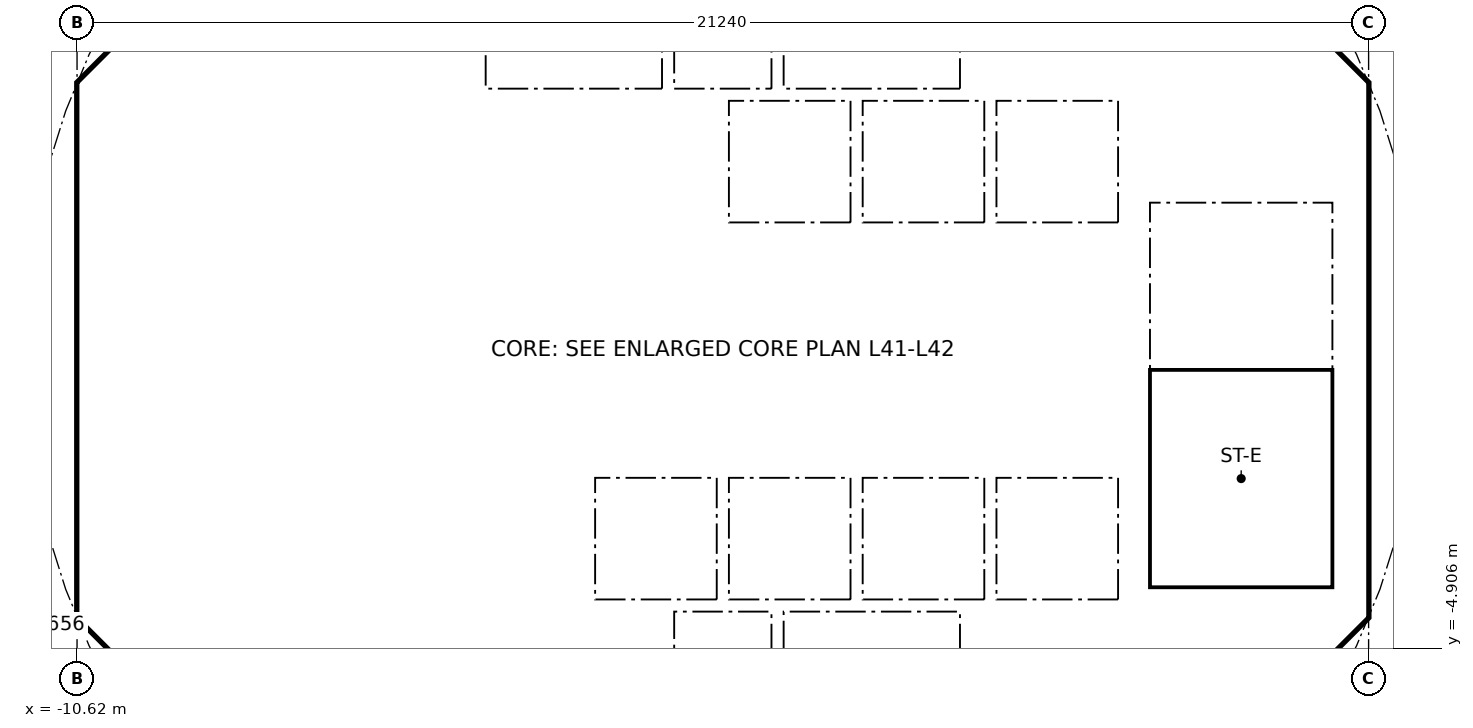
"""IFC4 building model, lengths in metres.
Left out: names, types, materials, properties, quantities, classifications, styles, units other than length and angle.
Written with IfcOpenShell. Run it as: python <this file> out.ifc"""

import sys

from ifc_helpers import new_model, si_unit, direction, frame, frame_2d, origin, place, context, subcontext, project, spatial, polyline, rectangle, outline, extrude, element, fill, save


model = new_model("IFC4")
c1 = context("Model", 3, precision=1e-05, world=origin(), true_north=direction((0.0, 1.0)))
c2 = subcontext(c1, "Body", "Model", "MODEL_VIEW")
j1 = project(units=[si_unit("LENGTHUNIT", "METRE"), si_unit("PLANEANGLEUNIT", "RADIAN")], contexts=[c1])
p1 = place(None, origin())
s1 = spatial("IfcSite", under=j1, at=p1, CompositionType="ELEMENT")
p2 = place(p1, origin())
s2 = spatial("IfcBuilding", under=s1, at=p2, CompositionType="ELEMENT")
p3 = place(p2, frame((0.0, 0.0, 165.9)))
s3 = spatial("IfcBuildingStorey", under=s2, at=p3, CompositionType="ELEMENT", Elevation=165.9)
p4 = place(p3, frame((9.988, 4.613, 0.0), z_axis=(0.0, 0.0, 1.0), x_axis=(-0.707106781187, 0.707106781187, 0.0)))
e1 = element("IfcWall", 1, at=p4, inside=s3, PredefinedType="SHEAR", context=c2, shape_type="SweptSolid", body=[
    extrude(rectangle(XDim=7.602, YDim=0.6, at=frame_2d((3.801, 0.0))), origin(), (0.0, 0.0, 1.0), 3.44),
])
p5 = place(p4, frame((3.201, 0.0, 0.0)))
e2 = element("IfcOpeningElement", 2, at=p5, cuts=e1, PredefinedType="OPENING", context=c2, shape_type="SweptSolid", body=[
    extrude(rectangle(XDim=1.2, YDim=2.1, at=frame_2d((0.6, 1.05))), frame((0.0, 0.31, 0.0), z_axis=(0.0, -1.0, 0.0), x_axis=(1.0, 0.0, 0.0)), (0.0, 0.0, 1.0), 0.62),
])
p6 = place(p3, frame((-4.613, 9.988, 0.0), z_axis=(0.0, 0.0, 1.0), x_axis=(-0.707106781187, -0.707106781187, 0.0)))
e3 = element("IfcWall", 3, at=p6, inside=s3, PredefinedType="SHEAR", context=c2, shape_type="SweptSolid", body=[
    extrude(rectangle(XDim=7.602, YDim=0.6, at=frame_2d((3.801, 0.0))), origin(), (0.0, 0.0, 1.0), 3.44),
])
p7 = place(p6, frame((0.351, 0.0, 0.0)))
e4 = element("IfcOpeningElement", 4, at=p7, cuts=e3, PredefinedType="OPENING", context=c2, shape_type="SweptSolid", body=[
    extrude(rectangle(XDim=1.1, YDim=2.1, at=frame_2d((0.55, 1.05))), frame((0.0, 0.31, 0.0), z_axis=(0.0, -1.0, 0.0), x_axis=(1.0, 0.0, 0.0)), (0.0, 0.0, 1.0), 0.62),
])
p8 = place(p3, frame((-10.325, 3.801, 0.0), z_axis=(0.0, 0.0, 1.0), x_axis=(0.0, -1.0, 0.0)))
e5 = element("IfcWall", 5, at=p8, inside=s3, PredefinedType="SHEAR", context=c2, shape_type="SweptSolid", body=[
    extrude(rectangle(XDim=7.602, YDim=0.6, at=frame_2d((3.801, 0.0))), origin(), (0.0, 0.0, 1.0), 3.44),
])
p9 = place(p8, frame((0.651, 0.0, 0.0)))
e6 = element("IfcOpeningElement", 6, at=p9, cuts=e5, PredefinedType="OPENING", context=c2, shape_type="SweptSolid", body=[
    extrude(rectangle(XDim=1.5, YDim=2.1, at=frame_2d((0.75, 1.05))), frame((0.0, 0.31, 0.0), z_axis=(0.0, -1.0, 0.0), x_axis=(1.0, 0.0, 0.0)), (0.0, 0.0, 1.0), 0.62),
])
p10 = place(p8, frame((5.451, 0.0, 0.0)))
e7 = element("IfcOpeningElement", 7, at=p10, cuts=e5, PredefinedType="OPENING", context=c2, shape_type="SweptSolid", body=[
    extrude(rectangle(XDim=1.5, YDim=2.1, at=frame_2d((0.75, 1.05))), frame((0.0, 0.31, 0.0), z_axis=(0.0, -1.0, 0.0), x_axis=(1.0, 0.0, 0.0)), (0.0, 0.0, 1.0), 0.62),
])
p11 = place(p3, frame((-9.988, -4.613, 0.0), z_axis=(0.0, 0.0, 1.0), x_axis=(0.707106781187, -0.707106781187, 0.0)))
e8 = element("IfcWall", 8, at=p11, inside=s3, PredefinedType="SHEAR", context=c2, shape_type="SweptSolid", body=[
    extrude(rectangle(XDim=7.602, YDim=0.6, at=frame_2d((3.801, 0.0))), origin(), (0.0, 0.0, 1.0), 3.44),
])
p12 = place(p11, frame((6.151, 0.0, 0.0)))
e9 = element("IfcOpeningElement", 9, at=p12, cuts=e8, PredefinedType="OPENING", context=c2, shape_type="SweptSolid", body=[
    extrude(rectangle(XDim=1.1, YDim=2.1, at=frame_2d((0.55, 1.05))), frame((0.0, 0.31, 0.0), z_axis=(0.0, -1.0, 0.0), x_axis=(1.0, 0.0, 0.0)), (0.0, 0.0, 1.0), 0.62),
])
p13 = place(p3, frame((4.613, -9.988, 0.0), z_axis=(0.0, 0.0, 1.0), x_axis=(0.707106781187, 0.707106781187, 0.0)))
e10 = element("IfcWall", 10, at=p13, inside=s3, PredefinedType="SHEAR", context=c2, shape_type="SweptSolid", body=[
    extrude(rectangle(XDim=7.602, YDim=0.6, at=frame_2d((3.801, 0.0))), origin(), (0.0, 0.0, 1.0), 3.44),
])
p14 = place(p13, frame((3.201, 0.0, 0.0)))
e11 = element("IfcOpeningElement", 11, at=p14, cuts=e10, PredefinedType="OPENING", context=c2, shape_type="SweptSolid", body=[
    extrude(rectangle(XDim=1.2, YDim=2.1, at=frame_2d((0.6, 1.05))), frame((0.0, 0.31, 0.0), z_axis=(0.0, -1.0, 0.0), x_axis=(1.0, 0.0, 0.0)), (0.0, 0.0, 1.0), 0.62),
])
p15 = place(p3, frame((-5.8, 4.3, 0.0), z_axis=(0.0, 0.0, 1.0), x_axis=(0.0, 1.0, 0.0)))
e12 = element("IfcWall", 12, at=p15, inside=s3, PredefinedType="PARTITIONING", context=c2, shape_type="SweptSolid", body=[
    extrude(rectangle(XDim=3.927, YDim=0.15, at=frame_2d((1.963, 0.0))), origin(), (0.0, 0.0, 1.0), 3.44),
])
p16 = place(p15, frame((1.551, 0.0, 0.0)))
e13 = element("IfcOpeningElement", 13, at=p16, cuts=e12, PredefinedType="OPENING", context=c2, shape_type="SweptSolid", body=[
    extrude(rectangle(XDim=0.9, YDim=2.1, at=frame_2d((0.45, 1.05))), frame((0.0, 0.085, 0.0), z_axis=(0.0, -1.0, 0.0), x_axis=(1.0, 0.0, 0.0)), (0.0, 0.0, 1.0), 0.17),
])
p17 = place(p3, frame((4.0, 4.3, 0.0), z_axis=(0.0, 0.0, 1.0), x_axis=(0.0, 1.0, 0.0)))
e14 = element("IfcWall", 14, at=p17, inside=s3, PredefinedType="SOLIDWALL", context=c2, shape_type="SweptSolid", body=[
    extrude(rectangle(XDim=2.2, YDim=0.2, at=frame_2d((1.1, 0.0))), origin(), (0.0, 0.0, 1.0), 3.44),
])
p18 = place(p17, frame((0.55, 0.0, 0.0)))
e15 = element("IfcOpeningElement", 15, at=p18, cuts=e14, PredefinedType="OPENING", context=c2, shape_type="SweptSolid", body=[
    extrude(rectangle(XDim=1.1, YDim=2.1, at=frame_2d((0.55, 1.05))), frame((0.0, 0.11, 0.0), z_axis=(0.0, -1.0, 0.0), x_axis=(1.0, 0.0, 0.0)), (0.0, 0.0, 1.0), 0.22),
])
p19 = place(p3, frame((-4.0, 4.3, 0.0), z_axis=(0.0, 0.0, 1.0), x_axis=(0.0, 1.0, 0.0)))
e16 = element("IfcWall", 16, at=p19, inside=s3, PredefinedType="SOLIDWALL", context=c2, shape_type="SweptSolid", body=[
    extrude(rectangle(XDim=2.2, YDim=0.2, at=frame_2d((1.1, 0.0))), origin(), (0.0, 0.0, 1.0), 3.44),
])
p20 = place(p19, frame((0.55, 0.0, 0.0)))
e17 = element("IfcOpeningElement", 17, at=p20, cuts=e16, PredefinedType="OPENING", context=c2, shape_type="SweptSolid", body=[
    extrude(rectangle(XDim=1.1, YDim=2.1, at=frame_2d((0.55, 1.05))), frame((0.0, 0.11, 0.0), z_axis=(0.0, -1.0, 0.0), x_axis=(1.0, 0.0, 0.0)), (0.0, 0.0, 1.0), 0.22),
])
p21 = place(p3, frame((-6.7, 2.0, 0.0), z_axis=(0.0, 0.0, 1.0), x_axis=(1.0, 0.0, 0.0)))
e18 = element("IfcWall", 18, at=p21, inside=s3, PredefinedType="SOLIDWALL", context=c2, shape_type="SweptSolid", body=[
    extrude(rectangle(XDim=13.4, YDim=0.2, at=frame_2d((6.7, 0.0))), origin(), (0.0, 0.0, 1.0), 3.44),
])
p22 = place(p21, frame((7.25, 0.0, 0.0)))
e19 = element("IfcOpeningElement", 19, at=p22, cuts=e18, PredefinedType="OPENING", context=c2, shape_type="SweptSolid", body=[
    extrude(rectangle(XDim=1.1, YDim=2.1, at=frame_2d((0.55, 1.05))), frame((0.0, 0.11, 0.0), z_axis=(0.0, -1.0, 0.0), x_axis=(1.0, 0.0, 0.0)), (0.0, 0.0, 1.0), 0.22),
])
p23 = place(p21, frame((9.45, 0.0, 0.0)))
e20 = element("IfcOpeningElement", 20, at=p23, cuts=e18, PredefinedType="OPENING", context=c2, shape_type="SweptSolid", body=[
    extrude(rectangle(XDim=1.1, YDim=2.1, at=frame_2d((0.55, 1.05))), frame((0.0, 0.11, 0.0), z_axis=(0.0, -1.0, 0.0), x_axis=(1.0, 0.0, 0.0)), (0.0, 0.0, 1.0), 0.22),
])
p24 = place(p21, frame((2.95, 0.0, 0.0)))
e21 = element("IfcOpeningElement", 21, at=p24, cuts=e18, PredefinedType="OPENING", context=c2, shape_type="SweptSolid", body=[
    extrude(rectangle(XDim=0.9, YDim=2.1, at=frame_2d((0.45, 1.05))), frame((0.0, 0.11, 0.0), z_axis=(0.0, -1.0, 0.0), x_axis=(1.0, 0.0, 0.0)), (0.0, 0.0, 1.0), 0.22),
])
p25 = place(p3, frame((6.7, 4.0, 0.0), z_axis=(0.0, 0.0, 1.0), x_axis=(1.0, 0.0, 0.0)))
e22 = element("IfcWall", 22, at=p25, inside=s3, PredefinedType="SOLIDWALL", context=c2, shape_type="SweptSolid", body=[
    extrude(rectangle(XDim=3.325, YDim=0.2, at=frame_2d((1.662, 0.0))), origin(), (0.0, 0.0, 1.0), 3.44),
])
p26 = place(p25, frame((1.25, 0.0, 0.0)))
e23 = element("IfcOpeningElement", 23, at=p26, cuts=e22, PredefinedType="OPENING", context=c2, shape_type="SweptSolid", body=[
    extrude(rectangle(XDim=1.1, YDim=2.1, at=frame_2d((0.55, 1.05))), frame((0.0, 0.11, 0.0), z_axis=(0.0, -1.0, 0.0), x_axis=(1.0, 0.0, 0.0)), (0.0, 0.0, 1.0), 0.22),
])
p27 = place(p3, frame((-5.8, -8.227, 0.0), z_axis=(0.0, 0.0, 1.0), x_axis=(0.0, 1.0, 0.0)))
e24 = element("IfcWall", 24, at=p27, inside=s3, PredefinedType="PARTITIONING", context=c2, shape_type="SweptSolid", body=[
    extrude(rectangle(XDim=3.927, YDim=0.15, at=frame_2d((1.963, 0.0))), origin(), (0.0, 0.0, 1.0), 3.44),
])
p28 = place(p27, frame((2.764, 0.0, 0.0)))
e25 = element("IfcOpeningElement", 25, at=p28, cuts=e24, PredefinedType="OPENING", context=c2, shape_type="SweptSolid", body=[
    extrude(rectangle(XDim=0.9, YDim=2.1, at=frame_2d((0.45, 1.05))), frame((0.0, 0.085, 0.0), z_axis=(0.0, -1.0, 0.0), x_axis=(1.0, 0.0, 0.0)), (0.0, 0.0, 1.0), 0.17),
])
p29 = place(p27, frame((0.688, 0.0, 0.0)))
e26 = element("IfcOpeningElement", 26, at=p29, cuts=e24, PredefinedType="OPENING", context=c2, shape_type="SweptSolid", body=[
    extrude(rectangle(XDim=0.9, YDim=2.1, at=frame_2d((0.45, 1.05))), frame((0.0, 0.085, 0.0), z_axis=(0.0, -1.0, 0.0), x_axis=(1.0, 0.0, 0.0)), (0.0, 0.0, 1.0), 0.17),
])
p30 = place(p3, frame((4.0, -6.5, 0.0), z_axis=(0.0, 0.0, 1.0), x_axis=(0.0, 1.0, 0.0)))
e27 = element("IfcWall", 27, at=p30, inside=s3, PredefinedType="SOLIDWALL", context=c2, shape_type="SweptSolid", body=[
    extrude(rectangle(XDim=2.2, YDim=0.2, at=frame_2d((1.1, 0.0))), origin(), (0.0, 0.0, 1.0), 3.44),
])
p31 = place(p30, frame((0.55, 0.0, 0.0)))
e28 = element("IfcOpeningElement", 28, at=p31, cuts=e27, PredefinedType="OPENING", context=c2, shape_type="SweptSolid", body=[
    extrude(rectangle(XDim=1.1, YDim=2.1, at=frame_2d((0.55, 1.05))), frame((0.0, 0.11, 0.0), z_axis=(0.0, -1.0, 0.0), x_axis=(1.0, 0.0, 0.0)), (0.0, 0.0, 1.0), 0.22),
])
p32 = place(p3, frame((-4.0, -6.5, 0.0), z_axis=(0.0, 0.0, 1.0), x_axis=(0.0, 1.0, 0.0)))
e29 = element("IfcWall", 29, at=p32, inside=s3, PredefinedType="SOLIDWALL", context=c2, shape_type="SweptSolid", body=[
    extrude(rectangle(XDim=2.2, YDim=0.2, at=frame_2d((1.1, 0.0))), origin(), (0.0, 0.0, 1.0), 3.44),
])
p33 = place(p32, frame((0.65, 0.0, 0.0)))
e30 = element("IfcOpeningElement", 30, at=p33, cuts=e29, PredefinedType="OPENING", context=c2, shape_type="SweptSolid", body=[
    extrude(rectangle(XDim=0.9, YDim=2.1, at=frame_2d((0.45, 1.05))), frame((0.0, 0.11, 0.0), z_axis=(0.0, -1.0, 0.0), x_axis=(1.0, 0.0, 0.0)), (0.0, 0.0, 1.0), 0.22),
])
p34 = place(p3, frame((-6.7, -2.0, 0.0), z_axis=(0.0, 0.0, 1.0), x_axis=(1.0, 0.0, 0.0)))
e31 = element("IfcWall", 31, at=p34, inside=s3, PredefinedType="SOLIDWALL", context=c2, shape_type="SweptSolid", body=[
    extrude(rectangle(XDim=13.4, YDim=0.2, at=frame_2d((6.7, 0.0))), origin(), (0.0, 0.0, 1.0), 3.44),
])
p35 = place(p34, frame((5.05, 0.0, 0.0)))
e32 = element("IfcOpeningElement", 32, at=p35, cuts=e31, PredefinedType="OPENING", context=c2, shape_type="SweptSolid", body=[
    extrude(rectangle(XDim=1.1, YDim=2.1, at=frame_2d((0.55, 1.05))), frame((0.0, 0.11, 0.0), z_axis=(0.0, -1.0, 0.0), x_axis=(1.0, 0.0, 0.0)), (0.0, 0.0, 1.0), 0.22),
])
p36 = place(p34, frame((7.25, 0.0, 0.0)))
e33 = element("IfcOpeningElement", 33, at=p36, cuts=e31, PredefinedType="OPENING", context=c2, shape_type="SweptSolid", body=[
    extrude(rectangle(XDim=1.1, YDim=2.1, at=frame_2d((0.55, 1.05))), frame((0.0, 0.11, 0.0), z_axis=(0.0, -1.0, 0.0), x_axis=(1.0, 0.0, 0.0)), (0.0, 0.0, 1.0), 0.22),
])
p37 = place(p34, frame((1.85, 0.0, 0.0)))
e34 = element("IfcOpeningElement", 34, at=p37, cuts=e31, PredefinedType="OPENING", context=c2, shape_type="SweptSolid", body=[
    extrude(rectangle(XDim=0.9, YDim=2.1, at=frame_2d((0.45, 1.05))), frame((0.0, 0.11, 0.0), z_axis=(0.0, -1.0, 0.0), x_axis=(1.0, 0.0, 0.0)), (0.0, 0.0, 1.0), 0.22),
])
p38 = place(p3, origin())
e35 = element("IfcWall", 35, at=p38, inside=s3, PredefinedType="SHEAR", context=c2, shape_type="SweptSolid", body=[
    extrude(outline(polyline([(-10.625, -3.801), (-10.025, -3.801), (-10.025, -4.152), (-9.776, -4.401), (-10.2, -4.825), (-10.625, -4.401), (-10.625, -3.801)])), origin(), (0.0, 0.0, 1.0), 3.44),
])
p39 = place(p3, origin())
e36 = element("IfcWall", 36, at=p39, inside=s3, PredefinedType="SHEAR", context=c2, shape_type="SweptSolid", body=[
    extrude(outline(polyline([(-10.2, 4.825), (-9.776, 4.401), (-10.025, 4.152), (-10.025, 3.801), (-10.625, 3.801), (-10.625, 4.401), (-10.2, 4.825)])), origin(), (0.0, 0.0, 1.0), 3.44),
])
p40 = place(p3, origin())
e37 = element("IfcWall", 37, at=p40, inside=s3, PredefinedType="SHEAR", context=c2, shape_type="SweptSolid", body=[
    extrude(outline(polyline([(9.776, -4.401), (10.025, -4.152), (10.025, -3.801), (10.025, 4.152), (9.776, 4.401), (10.2, 4.825), (10.625, 4.401), (10.625, -4.401), (10.2, -4.825), (9.776, -4.401)])), origin(), (0.0, 0.0, 1.0), 3.44),
])
for number, where, z_axis, x_axis in (
    (38, (-0.9, -6.5, 0.0), (0.0, 0.0, 1.0), (0.0, 1.0, 0.0)),
    (39, (0.9, -6.5, 0.0), (0.0, 0.0, 1.0), (0.0, 1.0, 0.0)),
):
    element("IfcWall", number, at=place(p3, frame(where, z_axis=z_axis, x_axis=x_axis)), inside=s3, PredefinedType="SOLIDWALL", context=c2, shape_type="SweptSolid", body=[
        extrude(rectangle(XDim=2.2, YDim=0.2, at=frame_2d((1.1, 0.0))), origin(), (0.0, 0.0, 1.0), 3.44),
    ])
p41 = place(p3, origin())
e40 = element("IfcWall", 40, at=p41, inside=s3, PredefinedType="SOLIDWALL", context=c2, shape_type="SweptSolid", body=[
    extrude(outline(polyline([(-6.7, -2.1), (-6.5, -2.1), (-6.5, -4.1), (-2.3, -4.1), (-2.3, -2.1), (-2.1, -2.1), (-2.1, -4.1), (-0.1, -4.1), (-0.1, -2.1), (0.1, -2.1), (0.1, -4.1), (2.1, -4.1), (2.1, -2.1), (2.3, -2.1), (2.3, -4.1), (4.3, -4.1), (4.3, -2.1), (4.5, -2.1), (4.5, -4.1), (6.5, -4.1), (6.5, -2.1), (6.7, -2.1), (6.7, -4.3), (-6.7, -4.3), (-6.7, -2.1)])), origin(), (0.0, 0.0, 1.0), 3.44),
])
for number, where, z_axis, x_axis in (
    (41, (-0.9, 4.3, 0.0), (0.0, 0.0, 1.0), (0.0, 1.0, 0.0)),
    (42, (0.9, 4.3, 0.0), (0.0, 0.0, 1.0), (0.0, 1.0, 0.0)),
):
    element("IfcWall", number, at=place(p3, frame(where, z_axis=z_axis, x_axis=x_axis)), inside=s3, PredefinedType="SOLIDWALL", context=c2, shape_type="SweptSolid", body=[
        extrude(rectangle(XDim=2.2, YDim=0.2, at=frame_2d((1.1, 0.0))), origin(), (0.0, 0.0, 1.0), 3.44),
    ])
p42 = place(p3, origin())
e43 = element("IfcWall", 43, at=p42, inside=s3, PredefinedType="SOLIDWALL", context=c2, shape_type="SweptSolid", body=[
    extrude(outline(polyline([(-6.7, 4.3), (6.7, 4.3), (6.7, 2.1), (6.5, 2.1), (6.5, 4.1), (4.5, 4.1), (4.5, 2.1), (4.3, 2.1), (4.3, 4.1), (2.3, 4.1), (2.3, 2.1), (2.1, 2.1), (2.1, 4.1), (0.1, 4.1), (0.1, 2.1), (-0.1, 2.1), (-0.1, 4.1), (-6.5, 4.1), (-6.5, 2.1), (-6.7, 2.1), (-6.7, 4.3)])), origin(), (0.0, 0.0, 1.0), 3.44),
])
for number, where, z_axis, x_axis in (
    (44, (-10.025, -4.0, 0.0), (0.0, 0.0, 1.0), (1.0, 0.0, 0.0)),
    (45, (-10.025, 4.0, 0.0), (0.0, 0.0, 1.0), (1.0, 0.0, 0.0)),
):
    element("IfcWall", number, at=place(p3, frame(where, z_axis=z_axis, x_axis=x_axis)), inside=s3, PredefinedType="PARTITIONING", context=c2, shape_type="SweptSolid", body=[
        extrude(rectangle(XDim=3.325, YDim=0.2, at=frame_2d((1.662, 0.0))), origin(), (0.0, 0.0, 1.0), 3.44),
    ])
p43 = place(p3, origin())
e46 = element("IfcWall", 46, at=p43, inside=s3, PredefinedType="SOLIDWALL", context=c2, shape_type="SweptSolid", body=[
    extrude(outline(polyline([(7.025, -3.9), (6.7, -3.9), (6.7, 3.9), (7.025, 3.9), (7.025, -3.9)])), origin(), (0.0, 0.0, 1.0), 3.44),
])
p44 = place(p3, origin())
e47 = element("IfcWall", 47, at=p44, inside=s3, PredefinedType="SOLIDWALL", context=c2, shape_type="SweptSolid", body=[
    extrude(outline(polyline([(10.025, -4.1), (6.7, -4.1), (6.7, -3.9), (10.025, -3.9), (10.025, -4.1)])), origin(), (0.0, 0.0, 1.0), 3.44),
])
p45 = place(p22, origin())
e48 = element("IfcDoor", 48, at=p45, inside=s3, OperationType="DOUBLE_DOOR_SLIDING", PredefinedType="DOOR", context=c2, shape_type="SweptSolid", body=[
    extrude(rectangle(XDim=1.1, YDim=2.1, at=frame_2d((0.55, 1.05))), frame((0.0, 0.025, 0.0), z_axis=(0.0, -1.0, 0.0), x_axis=(1.0, 0.0, 0.0)), (0.0, 0.0, 1.0), 0.05),
])
fill(e19, e48)
p46 = place(p23, origin())
e49 = element("IfcDoor", 49, at=p46, inside=s3, OperationType="DOUBLE_DOOR_SLIDING", PredefinedType="DOOR", context=c2, shape_type="SweptSolid", body=[
    extrude(rectangle(XDim=1.1, YDim=2.1, at=frame_2d((0.55, 1.05))), frame((0.0, 0.025, 0.0), z_axis=(0.0, -1.0, 0.0), x_axis=(1.0, 0.0, 0.0)), (0.0, 0.0, 1.0), 0.05),
])
fill(e20, e49)
p47 = place(p35, origin())
e50 = element("IfcDoor", 50, at=p47, inside=s3, OperationType="DOUBLE_DOOR_SLIDING", PredefinedType="DOOR", context=c2, shape_type="SweptSolid", body=[
    extrude(rectangle(XDim=1.1, YDim=2.1, at=frame_2d((0.55, 1.05))), frame((0.0, 0.025, 0.0), z_axis=(0.0, -1.0, 0.0), x_axis=(1.0, 0.0, 0.0)), (0.0, 0.0, 1.0), 0.05),
])
fill(e32, e50)
p48 = place(p36, origin())
e51 = element("IfcDoor", 51, at=p48, inside=s3, OperationType="DOUBLE_DOOR_SLIDING", PredefinedType="DOOR", context=c2, shape_type="SweptSolid", body=[
    extrude(rectangle(XDim=1.1, YDim=2.1, at=frame_2d((0.55, 1.05))), frame((0.0, 0.025, 0.0), z_axis=(0.0, -1.0, 0.0), x_axis=(1.0, 0.0, 0.0)), (0.0, 0.0, 1.0), 0.05),
])
fill(e33, e51)
p49 = place(p18, origin())
e52 = element("IfcDoor", 52, at=p49, inside=s3, OperationType="DOUBLE_DOOR_SLIDING", PredefinedType="DOOR", context=c2, shape_type="SweptSolid", body=[
    extrude(rectangle(XDim=1.1, YDim=2.1, at=frame_2d((0.55, 1.05))), frame((0.0, 0.025, 0.0), z_axis=(0.0, -1.0, 0.0), x_axis=(1.0, 0.0, 0.0)), (0.0, 0.0, 1.0), 0.05),
])
fill(e15, e52)
p50 = place(p31, origin())
e53 = element("IfcDoor", 53, at=p50, inside=s3, OperationType="DOUBLE_DOOR_SLIDING", PredefinedType="DOOR", context=c2, shape_type="SweptSolid", body=[
    extrude(rectangle(XDim=1.1, YDim=2.1, at=frame_2d((0.55, 1.05))), frame((0.0, 0.025, 0.0), z_axis=(0.0, -1.0, 0.0), x_axis=(1.0, 0.0, 0.0)), (0.0, 0.0, 1.0), 0.05),
])
fill(e28, e53)
p51 = place(p20, origin())
e54 = element("IfcDoor", 54, at=p51, inside=s3, OperationType="DOUBLE_DOOR_SLIDING", PredefinedType="DOOR", context=c2, shape_type="SweptSolid", body=[
    extrude(rectangle(XDim=1.1, YDim=2.1, at=frame_2d((0.55, 1.05))), frame((0.0, 0.025, 0.0), z_axis=(0.0, -1.0, 0.0), x_axis=(1.0, 0.0, 0.0)), (0.0, 0.0, 1.0), 0.05),
])
fill(e17, e54)
p52 = place(p26, frame((1.1, 0.0, 0.0), x_axis=(-1.0, 0.0, 0.0)))
e55 = element("IfcDoor", 55, at=p52, inside=s3, OperationType="SINGLE_SWING_RIGHT", PredefinedType="DOOR", context=c2, shape_type="SweptSolid", body=[
    extrude(rectangle(XDim=1.1, YDim=2.1, at=frame_2d((0.55, 1.05))), frame((0.0, 0.025, 0.0), z_axis=(0.0, -1.0, 0.0), x_axis=(1.0, 0.0, 0.0)), (0.0, 0.0, 1.0), 0.05),
])
fill(e23, e55)
p53 = place(p28, origin())
e56 = element("IfcDoor", 56, at=p53, inside=s3, OperationType="SINGLE_SWING_RIGHT", PredefinedType="DOOR", context=c2, shape_type="SweptSolid", body=[
    extrude(rectangle(XDim=0.9, YDim=2.1, at=frame_2d((0.45, 1.05))), frame((0.0, 0.025, 0.0), z_axis=(0.0, -1.0, 0.0), x_axis=(1.0, 0.0, 0.0)), (0.0, 0.0, 1.0), 0.05),
])
fill(e25, e56)
p54 = place(p24, origin())
e57 = element("IfcDoor", 57, at=p54, inside=s3, OperationType="SINGLE_SWING_LEFT", PredefinedType="DOOR", context=c2, shape_type="SweptSolid", body=[
    extrude(rectangle(XDim=0.9, YDim=2.1, at=frame_2d((0.45, 1.05))), frame((0.0, 0.025, 0.0), z_axis=(0.0, -1.0, 0.0), x_axis=(1.0, 0.0, 0.0)), (0.0, 0.0, 1.0), 0.05),
])
fill(e21, e57)
p55 = place(p37, frame((0.9, 0.0, 0.0), x_axis=(-1.0, 0.0, 0.0)))
e58 = element("IfcDoor", 58, at=p55, inside=s3, OperationType="SINGLE_SWING_RIGHT", PredefinedType="DOOR", context=c2, shape_type="SweptSolid", body=[
    extrude(rectangle(XDim=0.9, YDim=2.1, at=frame_2d((0.45, 1.05))), frame((0.0, 0.025, 0.0), z_axis=(0.0, -1.0, 0.0), x_axis=(1.0, 0.0, 0.0)), (0.0, 0.0, 1.0), 0.05),
])
fill(e34, e58)
p56 = place(p9, origin())
e59 = element("IfcDoor", 59, at=p56, inside=s3, OperationType="DOUBLE_DOOR_SINGLE_SWING", PredefinedType="DOOR", context=c2, shape_type="SweptSolid", body=[
    extrude(rectangle(XDim=1.5, YDim=2.1, at=frame_2d((0.75, 1.05))), frame((0.0, 0.025, 0.0), z_axis=(0.0, -1.0, 0.0), x_axis=(1.0, 0.0, 0.0)), (0.0, 0.0, 1.0), 0.05),
])
fill(e6, e59)
p57 = place(p10, origin())
e60 = element("IfcDoor", 60, at=p57, inside=s3, OperationType="DOUBLE_DOOR_SINGLE_SWING", PredefinedType="DOOR", context=c2, shape_type="SweptSolid", body=[
    extrude(rectangle(XDim=1.5, YDim=2.1, at=frame_2d((0.75, 1.05))), frame((0.0, 0.025, 0.0), z_axis=(0.0, -1.0, 0.0), x_axis=(1.0, 0.0, 0.0)), (0.0, 0.0, 1.0), 0.05),
])
fill(e7, e60)
save(model, sys.argv[1])
